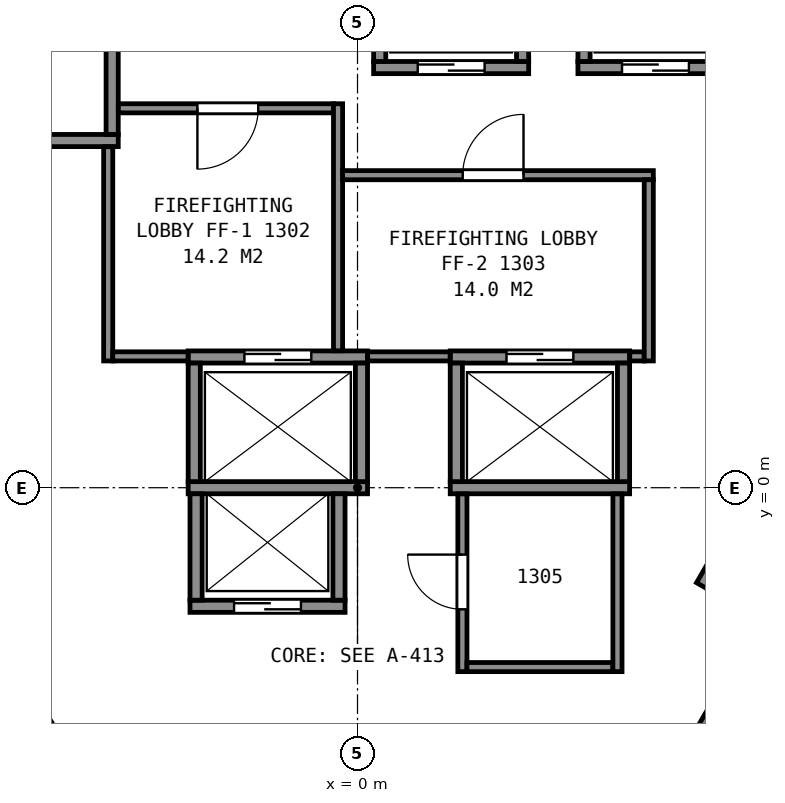
"""IFC4 building model, lengths in metres.
Left out: names, types, materials, properties, quantities, classifications, styles, units other than length and angle.
Written with IfcOpenShell. Run it as: python <this file> out.ifc"""

import sys

from ifc_helpers import new_model, si_unit, direction, frame, frame_2d, origin, place, context, subcontext, project, spatial, rectangle, extrude, element, fill, save


model = new_model("IFC4")
c1 = context("Model", 3, precision=1e-05, world=origin(), true_north=direction((0.0, 1.0)))
c2 = subcontext(c1, "Body", "Model", "MODEL_VIEW")
j1 = project(units=[si_unit("LENGTHUNIT", "METRE"), si_unit("PLANEANGLEUNIT", "RADIAN")], contexts=[c1])
p1 = place(None, origin())
s1 = spatial("IfcSite", under=j1, at=p1, CompositionType="ELEMENT")
p2 = place(p1, origin())
s2 = spatial("IfcBuilding", under=s1, at=p2, CompositionType="ELEMENT")
p3 = place(p2, frame((0.0, 0.0, 62.0)))
s3 = spatial("IfcBuildingStorey", under=s2, at=p3, CompositionType="ELEMENT", Elevation=62.0)
p4 = place(p3, frame((-2.755, -1.95, 0.0), z_axis=(0.0, 0.0, 1.0), x_axis=(1.0, 0.0, 0.0)))
e1 = element("IfcWall", 1, at=p4, inside=s3, PredefinedType="PARTITIONING", context=c2, shape_type="SweptSolid", body=[
    extrude(rectangle(XDim=2.55, YDim=0.2, at=frame_2d((1.275, 0.0))), origin(), (0.0, 0.0, 1.0), 3.6),
])
p5 = place(p4, frame((0.725, 0.0, 0.0)))
e2 = element("IfcOpeningElement", 2, at=p5, cuts=e1, PredefinedType="OPENING", context=c2, shape_type="SweptSolid", body=[
    extrude(rectangle(XDim=1.1, YDim=2.1, at=frame_2d((0.55, 1.05))), frame((0.0, 0.11, 0.0), z_axis=(0.0, -1.0, 0.0), x_axis=(1.0, 0.0, 0.0)), (0.0, 0.0, 1.0), 0.22),
])
p6 = place(p3, frame((-2.785, 0.0, 0.0), z_axis=(0.0, 0.0, 1.0), x_axis=(1.0, 0.0, 0.0)))
e3 = element("IfcWall", 3, at=p6, inside=s3, PredefinedType="PARTITIONING", context=c2, shape_type="SweptSolid", body=[
    extrude(rectangle(XDim=2.95, YDim=0.2, at=frame_2d((1.475, 0.0))), origin(), (0.0, 0.0, 1.0), 3.6),
])
p7 = place(p3, frame((1.525, 0.0, 0.0), z_axis=(0.0, 0.0, 1.0), x_axis=(1.0, 0.0, 0.0)))
e4 = element("IfcWall", 4, at=p7, inside=s3, PredefinedType="PARTITIONING", context=c2, shape_type="SweptSolid", body=[
    extrude(rectangle(XDim=2.95, YDim=0.2, at=frame_2d((1.475, 0.0))), origin(), (0.0, 0.0, 1.0), 3.6),
])
p8 = place(p3, frame((-2.785, 2.15, 0.0), z_axis=(0.0, 0.0, 1.0), x_axis=(1.0, 0.0, 0.0)))
e5 = element("IfcWall", 5, at=p8, inside=s3, PredefinedType="PARTITIONING", context=c2, shape_type="SweptSolid", body=[
    extrude(rectangle(XDim=2.95, YDim=0.2, at=frame_2d((1.475, 0.0))), origin(), (0.0, 0.0, 1.0), 3.6),
])
p9 = place(p8, frame((0.925, 0.0, 0.0)))
e6 = element("IfcOpeningElement", 6, at=p9, cuts=e5, PredefinedType="OPENING", context=c2, shape_type="SweptSolid", body=[
    extrude(rectangle(XDim=1.1, YDim=2.1, at=frame_2d((0.55, 1.05))), frame((0.0, 0.11, 0.0), z_axis=(0.0, -1.0, 0.0), x_axis=(1.0, 0.0, 0.0)), (0.0, 0.0, 1.0), 0.22),
])
p10 = place(p3, frame((1.525, 2.15, 0.0), z_axis=(0.0, 0.0, 1.0), x_axis=(1.0, 0.0, 0.0)))
e7 = element("IfcWall", 7, at=p10, inside=s3, PredefinedType="PARTITIONING", context=c2, shape_type="SweptSolid", body=[
    extrude(rectangle(XDim=2.95, YDim=0.2, at=frame_2d((1.475, 0.0))), origin(), (0.0, 0.0, 1.0), 3.6),
])
p11 = place(p10, frame((0.925, 0.0, 0.0)))
e8 = element("IfcOpeningElement", 8, at=p11, cuts=e7, PredefinedType="OPENING", context=c2, shape_type="SweptSolid", body=[
    extrude(rectangle(XDim=1.1, YDim=2.1, at=frame_2d((0.55, 1.05))), frame((0.0, 0.11, 0.0), z_axis=(0.0, -1.0, 0.0), x_axis=(1.0, 0.0, 0.0)), (0.0, 0.0, 1.0), 0.22),
])
p12 = place(p3, frame((-6.285, 5.71, 0.0), z_axis=(0.0, 0.0, 1.0), x_axis=(1.0, 0.0, 0.0)))
e9 = element("IfcWall", 9, at=p12, inside=s3, PredefinedType="PARTITIONING", context=c2, shape_type="SweptSolid", body=[
    extrude(rectangle(XDim=2.35, YDim=0.2, at=frame_2d((1.175, 0.0))), origin(), (0.0, 0.0, 1.0), 3.6),
])
p13 = place(p3, frame((0.265, 6.91, 0.0), z_axis=(0.0, 0.0, 1.0), x_axis=(1.0, 0.0, 0.0)))
e10 = element("IfcWall", 10, at=p13, inside=s3, PredefinedType="PARTITIONING", context=c2, shape_type="SweptSolid", body=[
    extrude(rectangle(XDim=2.55, YDim=0.2, at=frame_2d((1.275, 0.0))), origin(), (0.0, 0.0, 1.0), 3.6),
])
p14 = place(p13, frame((0.725, 0.0, 0.0)))
e11 = element("IfcOpeningElement", 11, at=p14, cuts=e10, PredefinedType="OPENING", context=c2, shape_type="SweptSolid", body=[
    extrude(rectangle(XDim=1.1, YDim=2.1, at=frame_2d((0.55, 1.05))), frame((0.0, 0.11, 0.0), z_axis=(0.0, -1.0, 0.0), x_axis=(1.0, 0.0, 0.0)), (0.0, 0.0, 1.0), 0.22),
])
p15 = place(p3, frame((3.625, 6.91, 0.0), z_axis=(0.0, 0.0, 1.0), x_axis=(1.0, 0.0, 0.0)))
e12 = element("IfcWall", 12, at=p15, inside=s3, PredefinedType="PARTITIONING", context=c2, shape_type="SweptSolid", body=[
    extrude(rectangle(XDim=2.55, YDim=0.2, at=frame_2d((1.275, 0.0))), origin(), (0.0, 0.0, 1.0), 3.6),
])
p16 = place(p15, frame((0.725, 0.0, 0.0)))
e13 = element("IfcOpeningElement", 13, at=p16, cuts=e12, PredefinedType="OPENING", context=c2, shape_type="SweptSolid", body=[
    extrude(rectangle(XDim=1.1, YDim=2.1, at=frame_2d((0.55, 1.05))), frame((0.0, 0.11, 0.0), z_axis=(0.0, -1.0, 0.0), x_axis=(1.0, 0.0, 0.0)), (0.0, 0.0, 1.0), 0.22),
])
p17 = place(p3, frame((5.527, -4.247, 0.0), z_axis=(0.0, 0.0, 1.0), x_axis=(0.499938297808, 0.866061024631, 0.0)))
e14 = element("IfcWall", 14, at=p17, inside=s3, PredefinedType="PARTITIONING", context=c2, shape_type="SweptSolid", body=[
    extrude(rectangle(XDim=2.35, YDim=0.2, at=frame_2d((1.175, 0.0))), origin(), (0.0, 0.0, 1.0), 3.6),
])
p18 = place(p17, frame((0.725, 0.0, 0.0)))
e15 = element("IfcOpeningElement", 15, at=p18, cuts=e14, PredefinedType="OPENING", context=c2, shape_type="SweptSolid", body=[
    extrude(rectangle(XDim=1.1, YDim=2.1, at=frame_2d((0.55, 1.05))), frame((0.0, 0.11, 0.0), z_axis=(0.0, -1.0, 0.0), x_axis=(1.0, 0.0, 0.0)), (0.0, 0.0, 1.0), 0.22),
])
p19 = place(p3, frame((5.663, -1.612, 0.0), z_axis=(0.0, 0.0, 1.0), x_axis=(0.49998122708, 0.866036242063, 0.0)))
e16 = element("IfcWall", 16, at=p19, inside=s3, PredefinedType="PARTITIONING", context=c2, shape_type="SweptSolid", body=[
    extrude(rectangle(XDim=4.9, YDim=0.2, at=frame_2d((2.45, 0.0))), origin(), (0.0, 0.0, 1.0), 3.6),
])
p20 = place(p3, frame((4.375, 0.1, 0.0), z_axis=(0.0, 0.0, 1.0), x_axis=(0.0, 1.0, 0.0)))
e17 = element("IfcWall", 17, at=p20, inside=s3, PredefinedType="PARTITIONING", context=c2, shape_type="SweptSolid", body=[
    extrude(rectangle(XDim=1.95, YDim=0.2, at=frame_2d((0.975, 0.0))), origin(), (0.0, 0.0, 1.0), 3.6),
])
for number, where, z_axis, x_axis in (
    (18, (3.725, 7.01, 0.0), (0.0, 0.0, 1.0), (0.0, 1.0, 0.0)),
    (19, (2.715, 7.01, 0.0), (0.0, 0.0, 1.0), (0.0, 1.0, 0.0)),
):
    element("IfcWall", number, at=place(p3, frame(where, z_axis=z_axis, x_axis=x_axis)), inside=s3, PredefinedType="PARTITIONING", context=c2, shape_type="SweptSolid", body=[
        extrude(rectangle(XDim=1.75, YDim=0.2, at=frame_2d((0.875, 0.0))), origin(), (0.0, 0.0, 1.0), 3.6),
    ])
p21 = place(p3, frame((1.625, 0.1, 0.0), z_axis=(0.0, 0.0, 1.0), x_axis=(0.0, 1.0, 0.0)))
e20 = element("IfcWall", 20, at=p21, inside=s3, PredefinedType="PARTITIONING", context=c2, shape_type="SweptSolid", body=[
    extrude(rectangle(XDim=1.95, YDim=0.2, at=frame_2d((0.975, 0.0))), origin(), (0.0, 0.0, 1.0), 3.6),
])
p22 = place(p3, frame((0.365, 7.01, 0.0), z_axis=(0.0, 0.0, 1.0), x_axis=(0.0, 1.0, 0.0)))
e21 = element("IfcWall", 21, at=p22, inside=s3, PredefinedType="PARTITIONING", context=c2, shape_type="SweptSolid", body=[
    extrude(rectangle(XDim=1.75, YDim=0.2, at=frame_2d((0.875, 0.0))), origin(), (0.0, 0.0, 1.0), 3.6),
])
p23 = place(p3, frame((0.065, 0.1, 0.0), z_axis=(0.0, 0.0, 1.0), x_axis=(0.0, 1.0, 0.0)))
e22 = element("IfcWall", 22, at=p23, inside=s3, PredefinedType="PARTITIONING", context=c2, shape_type="SweptSolid", body=[
    extrude(rectangle(XDim=1.95, YDim=0.2, at=frame_2d((0.975, 0.0))), origin(), (0.0, 0.0, 1.0), 3.6),
])
for number, where, z_axis, x_axis in (
    (23, (-0.305, -1.85, 0.0), (0.0, 0.0, 1.0), (0.0, 1.0, 0.0)),
    (24, (-2.655, -1.85, 0.0), (0.0, 0.0, 1.0), (0.0, 1.0, 0.0)),
):
    element("IfcWall", number, at=place(p3, frame(where, z_axis=z_axis, x_axis=x_axis)), inside=s3, PredefinedType="PARTITIONING", context=c2, shape_type="SweptSolid", body=[
        extrude(rectangle(XDim=1.75, YDim=0.2, at=frame_2d((0.875, 0.0))), origin(), (0.0, 0.0, 1.0), 3.6),
    ])
p24 = place(p3, frame((-2.685, 0.1, 0.0), z_axis=(0.0, 0.0, 1.0), x_axis=(0.0, 1.0, 0.0)))
e25 = element("IfcWall", 25, at=p24, inside=s3, PredefinedType="PARTITIONING", context=c2, shape_type="SweptSolid", body=[
    extrude(rectangle(XDim=1.95, YDim=0.2, at=frame_2d((0.975, 0.0))), origin(), (0.0, 0.0, 1.0), 3.6),
])
p25 = place(p3, frame((-4.035, 5.81, 0.0), z_axis=(0.0, 0.0, 1.0), x_axis=(0.0, 1.0, 0.0)))
e26 = element("IfcWall", 26, at=p25, inside=s3, PredefinedType="PARTITIONING", context=c2, shape_type="SweptSolid", body=[
    extrude(rectangle(XDim=1.75, YDim=0.2, at=frame_2d((0.875, 0.0))), origin(), (0.0, 0.0, 1.0), 3.6),
])
p26 = place(p3, frame((-13.664, 5.946, 0.0), z_axis=(0.0, 0.0, 1.0), x_axis=(0.499994327219, -0.866028678941, 0.0)))
e27 = element("IfcWall", 27, at=p26, inside=s3, PredefinedType="PARTITIONING", context=c2, shape_type="SweptSolid", body=[
    extrude(rectangle(XDim=23.968, YDim=0.2, at=frame_2d((11.984, 0.0))), origin(), (0.0, 0.0, 1.0), 3.35),
])
p27 = place(p3, frame((-4.091, -5.635, 0.0), z_axis=(0.0, 0.0, 1.0), x_axis=(-0.499948934428, 0.866054884499, 0.0)))
e28 = element("IfcWall", 28, at=p27, inside=s3, PredefinedType="PARTITIONING", context=c2, shape_type="SweptSolid", body=[
    extrude(rectangle(XDim=3.577, YDim=0.15, at=frame_2d((1.789, 0.0))), origin(), (0.0, 0.0, 1.0), 3.35),
])
p28 = place(p27, frame((2.377, 0.0, 0.0)))
e29 = element("IfcOpeningElement", 29, at=p28, cuts=e28, PredefinedType="OPENING", context=c2, shape_type="SweptSolid", body=[
    extrude(rectangle(XDim=0.9, YDim=2.1, at=frame_2d((0.45, 1.05))), frame((0.0, 0.085, 0.0), z_axis=(0.0, -1.0, 0.0), x_axis=(1.0, 0.0, 0.0)), (0.0, 0.0, 1.0), 0.17),
])
p29 = place(p27, frame((0.605, 0.0, 0.0)))
e30 = element("IfcOpeningElement", 30, at=p29, cuts=e28, PredefinedType="OPENING", context=c2, shape_type="SweptSolid", body=[
    extrude(rectangle(XDim=0.9, YDim=2.1, at=frame_2d((0.45, 1.05))), frame((0.0, 0.085, 0.0), z_axis=(0.0, -1.0, 0.0), x_axis=(1.0, 0.0, 0.0)), (0.0, 0.0, 1.0), 0.17),
])
p30 = place(p3, frame((-4.1, 2.085, 0.0), z_axis=(0.0, 0.0, 1.0), x_axis=(0.0, 1.0, 0.0)))
e31 = element("IfcWall", 31, at=p30, inside=s3, PredefinedType="PARTITIONING", context=c2, shape_type="SweptSolid", body=[
    extrude(rectangle(XDim=3.523, YDim=0.15, at=frame_2d((1.761, 0.0))), origin(), (0.0, 0.0, 1.0), 3.35),
])
p31 = place(p3, frame((-4.025, 2.16, 0.0), z_axis=(0.0, 0.0, 1.0), x_axis=(1.0, 0.0, 0.0)))
e32 = element("IfcWall", 32, at=p31, inside=s3, PredefinedType="PARTITIONING", context=c2, shape_type="SweptSolid", body=[
    extrude(rectangle(XDim=1.238, YDim=0.15, at=frame_2d((0.619, 0.0))), origin(), (0.0, 0.0, 1.0), 3.35),
])
p32 = place(p3, frame((-3.933, 6.24, 0.0), z_axis=(0.0, 0.0, 1.0), x_axis=(1.0, 0.0, 0.0)))
e33 = element("IfcWall", 33, at=p32, inside=s3, PredefinedType="PARTITIONING", context=c2, shape_type="SweptSolid", body=[
    extrude(rectangle(XDim=3.538, YDim=0.15, at=frame_2d((1.769, 0.0))), origin(), (0.0, 0.0, 1.0), 3.35),
])
p33 = place(p32, frame((1.3, 0.0, 0.0)))
e34 = element("IfcOpeningElement", 34, at=p33, cuts=e33, PredefinedType="OPENING", context=c2, shape_type="SweptSolid", body=[
    extrude(rectangle(XDim=1.0, YDim=2.1, at=frame_2d((0.5, 1.05))), frame((0.0, 0.085, 0.0), z_axis=(0.0, -1.0, 0.0), x_axis=(1.0, 0.0, 0.0)), (0.0, 0.0, 1.0), 0.17),
])
p34 = place(p3, frame((-0.32, 2.252, 0.0), z_axis=(0.0, 0.0, 1.0), x_axis=(0.0, 1.0, 0.0)))
e35 = element("IfcWall", 35, at=p34, inside=s3, PredefinedType="PARTITIONING", context=c2, shape_type="SweptSolid", body=[
    extrude(rectangle(XDim=4.063, YDim=0.15, at=frame_2d((2.031, 0.0))), origin(), (0.0, 0.0, 1.0), 3.35),
])
p35 = place(p3, frame((-0.245, 5.14, 0.0), z_axis=(0.0, 0.0, 1.0), x_axis=(1.0, 0.0, 0.0)))
e36 = element("IfcWall", 36, at=p35, inside=s3, PredefinedType="PARTITIONING", context=c2, shape_type="SweptSolid", body=[
    extrude(rectangle(XDim=5.11, YDim=0.15, at=frame_2d((2.555, 0.0))), origin(), (0.0, 0.0, 1.0), 3.35),
])
p36 = place(p35, frame((1.975, 0.0, 0.0)))
e37 = element("IfcOpeningElement", 37, at=p36, cuts=e36, PredefinedType="OPENING", context=c2, shape_type="SweptSolid", body=[
    extrude(rectangle(XDim=1.0, YDim=2.1, at=frame_2d((0.5, 1.05))), frame((0.0, 0.085, 0.0), z_axis=(0.0, -1.0, 0.0), x_axis=(1.0, 0.0, 0.0)), (0.0, 0.0, 1.0), 0.17),
])
p37 = place(p3, frame((0.167, 2.16, 0.0), z_axis=(0.0, 0.0, 1.0), x_axis=(1.0, 0.0, 0.0)))
e38 = element("IfcWall", 38, at=p37, inside=s3, PredefinedType="PARTITIONING", context=c2, shape_type="SweptSolid", body=[
    extrude(rectangle(XDim=1.356, YDim=0.15, at=frame_2d((0.678, 0.0))), origin(), (0.0, 0.0, 1.0), 3.35),
])
p38 = place(p3, frame((1.725, -0.102, 0.0), z_axis=(0.0, 0.0, 1.0), x_axis=(0.0, -1.0, 0.0)))
e39 = element("IfcWall", 39, at=p38, inside=s3, PredefinedType="PARTITIONING", context=c2, shape_type="SweptSolid", body=[
    extrude(rectangle(XDim=2.923, YDim=0.15, at=frame_2d((1.461, 0.0))), origin(), (0.0, 0.0, 1.0), 3.35),
])
p39 = place(p38, frame((0.998, 0.0, 0.0)))
e40 = element("IfcOpeningElement", 40, at=p39, cuts=e39, PredefinedType="OPENING", context=c2, shape_type="SweptSolid", body=[
    extrude(rectangle(XDim=0.9, YDim=2.1, at=frame_2d((0.45, 1.05))), frame((0.0, 0.085, 0.0), z_axis=(0.0, -1.0, 0.0), x_axis=(1.0, 0.0, 0.0)), (0.0, 0.0, 1.0), 0.17),
])
p40 = place(p3, frame((1.8, -2.95, 0.0), z_axis=(0.0, 0.0, 1.0), x_axis=(1.0, 0.0, 0.0)))
e41 = element("IfcWall", 41, at=p40, inside=s3, PredefinedType="PARTITIONING", context=c2, shape_type="SweptSolid", body=[
    extrude(rectangle(XDim=2.4, YDim=0.15, at=frame_2d((1.2, 0.0))), origin(), (0.0, 0.0, 1.0), 3.35),
])
p41 = place(p3, frame((4.275, -3.025, 0.0), z_axis=(0.0, 0.0, 1.0), x_axis=(0.0, 1.0, 0.0)))
e42 = element("IfcWall", 42, at=p41, inside=s3, PredefinedType="PARTITIONING", context=c2, shape_type="SweptSolid", body=[
    extrude(rectangle(XDim=2.923, YDim=0.15, at=frame_2d((1.461, 0.0))), origin(), (0.0, 0.0, 1.0), 3.35),
])
p42 = place(p3, frame((4.477, 2.16, 0.0), z_axis=(0.0, 0.0, 1.0), x_axis=(1.0, 0.0, 0.0)))
e43 = element("IfcWall", 43, at=p42, inside=s3, PredefinedType="PARTITIONING", context=c2, shape_type="SweptSolid", body=[
    extrude(rectangle(XDim=0.238, YDim=0.15, at=frame_2d((0.119, 0.0))), origin(), (0.0, 0.0, 1.0), 3.35),
])
p43 = place(p3, frame((4.79, 2.085, 0.0), z_axis=(0.0, 0.0, 1.0), x_axis=(0.0, 1.0, 0.0)))
e44 = element("IfcWall", 44, at=p43, inside=s3, PredefinedType="PARTITIONING", context=c2, shape_type="SweptSolid", body=[
    extrude(rectangle(XDim=2.98, YDim=0.15, at=frame_2d((1.49, 0.0))), origin(), (0.0, 0.0, 1.0), 3.35),
])
p44 = place(p3, frame((-3.766, -17.558, 0.0), z_axis=(0.0, 0.0, 1.0), x_axis=(-0.500008349927, 0.866020582898, 0.0)))
e45 = element("IfcWall", 45, at=p44, inside=s3, PredefinedType="PARTITIONING", context=c2, shape_type="SweptSolid", body=[
    extrude(rectangle(XDim=22.496, YDim=0.125, at=frame_2d((11.248, 0.0))), origin(), (0.0, 0.0, 1.0), 2.613),
])
p45 = place(p44, frame((20.563, 0.0, 0.0)))
e46 = element("IfcOpeningElement", 46, at=p45, cuts=e45, PredefinedType="OPENING", context=c2, shape_type="SweptSolid", body=[
    extrude(rectangle(XDim=0.9, YDim=2.1, at=frame_2d((0.45, 1.05))), frame((0.0, 0.073, 0.0), z_axis=(0.0, -1.0, 0.0), x_axis=(1.0, 0.0, 0.0)), (0.0, 0.0, 1.0), 0.145),
])
p46 = place(p44, frame((13.476, 0.0, 0.0)))
e47 = element("IfcOpeningElement", 47, at=p46, cuts=e45, PredefinedType="OPENING", context=c2, shape_type="SweptSolid", body=[
    extrude(rectangle(XDim=0.9, YDim=2.1, at=frame_2d((0.45, 1.05))), frame((0.0, 0.073, 0.0), z_axis=(0.0, -1.0, 0.0), x_axis=(1.0, 0.0, 0.0)), (0.0, 0.0, 1.0), 0.145),
])
p47 = place(p44, frame((10.684, 0.0, 0.0)))
e48 = element("IfcOpeningElement", 48, at=p47, cuts=e45, PredefinedType="OPENING", context=c2, shape_type="SweptSolid", body=[
    extrude(rectangle(XDim=0.9, YDim=2.1, at=frame_2d((0.45, 1.05))), frame((0.0, 0.073, 0.0), z_axis=(0.0, -1.0, 0.0), x_axis=(1.0, 0.0, 0.0)), (0.0, 0.0, 1.0), 0.145),
])
p48 = place(p44, frame((3.948, 0.0, 0.0)))
e49 = element("IfcOpeningElement", 49, at=p48, cuts=e45, PredefinedType="OPENING", context=c2, shape_type="SweptSolid", body=[
    extrude(rectangle(XDim=0.9, YDim=2.1, at=frame_2d((0.45, 1.05))), frame((0.0, 0.073, 0.0), z_axis=(0.0, -1.0, 0.0), x_axis=(1.0, 0.0, 0.0)), (0.0, 0.0, 1.0), 0.145),
])
p49 = place(p44, frame((1.411, 0.0, 0.0)))
e50 = element("IfcOpeningElement", 50, at=p49, cuts=e45, PredefinedType="OPENING", context=c2, shape_type="SweptSolid", body=[
    extrude(rectangle(XDim=0.9, YDim=2.1, at=frame_2d((0.45, 1.05))), frame((0.0, 0.073, 0.0), z_axis=(0.0, -1.0, 0.0), x_axis=(1.0, 0.0, 0.0)), (0.0, 0.0, 1.0), 0.145),
])
p50 = place(p3, frame((17.486, 6.206, 0.0), z_axis=(0.0, 0.0, 1.0), x_axis=(-0.499990458811, -0.866030912322, 0.0)))
e51 = element("IfcWall", 51, at=p50, inside=s3, PredefinedType="PARTITIONING", context=c2, shape_type="SweptSolid", body=[
    extrude(rectangle(XDim=27.441, YDim=0.125, at=frame_2d((13.721, 0.0))), origin(), (0.0, 0.0, 1.0), 2.613),
])
p51 = place(p50, frame((20.529, 0.0, 0.0)))
e52 = element("IfcOpeningElement", 52, at=p51, cuts=e51, PredefinedType="OPENING", context=c2, shape_type="SweptSolid", body=[
    extrude(rectangle(XDim=0.9, YDim=2.1, at=frame_2d((0.45, 1.05))), frame((0.0, 0.073, 0.0), z_axis=(0.0, -1.0, 0.0), x_axis=(1.0, 0.0, 0.0)), (0.0, 0.0, 1.0), 0.145),
])
p52 = place(p50, frame((17.516, 0.0, 0.0)))
e53 = element("IfcOpeningElement", 53, at=p52, cuts=e51, PredefinedType="OPENING", context=c2, shape_type="SweptSolid", body=[
    extrude(rectangle(XDim=0.9, YDim=2.1, at=frame_2d((0.45, 1.05))), frame((0.0, 0.073, 0.0), z_axis=(0.0, -1.0, 0.0), x_axis=(1.0, 0.0, 0.0)), (0.0, 0.0, 1.0), 0.145),
])
p53 = place(p50, frame((10.168, 0.0, 0.0)))
e54 = element("IfcOpeningElement", 54, at=p53, cuts=e51, PredefinedType="OPENING", context=c2, shape_type="SweptSolid", body=[
    extrude(rectangle(XDim=0.9, YDim=2.1, at=frame_2d((0.45, 1.05))), frame((0.0, 0.073, 0.0), z_axis=(0.0, -1.0, 0.0), x_axis=(1.0, 0.0, 0.0)), (0.0, 0.0, 1.0), 0.145),
])
p54 = place(p50, frame((7.403, 0.0, 0.0)))
e55 = element("IfcOpeningElement", 55, at=p54, cuts=e51, PredefinedType="OPENING", context=c2, shape_type="SweptSolid", body=[
    extrude(rectangle(XDim=0.9, YDim=2.1, at=frame_2d((0.45, 1.05))), frame((0.0, 0.073, 0.0), z_axis=(0.0, -1.0, 0.0), x_axis=(1.0, 0.0, 0.0)), (0.0, 0.0, 1.0), 0.145),
])
p55 = place(p50, frame((0.741, 0.0, 0.0)))
e56 = element("IfcOpeningElement", 56, at=p55, cuts=e51, PredefinedType="OPENING", context=c2, shape_type="SweptSolid", body=[
    extrude(rectangle(XDim=0.9, YDim=2.1, at=frame_2d((0.45, 1.05))), frame((0.0, 0.073, 0.0), z_axis=(0.0, -1.0, 0.0), x_axis=(1.0, 0.0, 0.0)), (0.0, 0.0, 1.0), 0.145),
])
p56 = place(p14, origin())
e57 = element("IfcDoor", 57, at=p56, inside=s3, OperationType="SLIDING_TO_LEFT", PredefinedType="DOOR", context=c2, shape_type="SweptSolid", body=[
    extrude(rectangle(XDim=1.1, YDim=2.1, at=frame_2d((0.55, 1.05))), frame((0.0, 0.025, 0.0), z_axis=(0.0, -1.0, 0.0), x_axis=(1.0, 0.0, 0.0)), (0.0, 0.0, 1.0), 0.05),
])
fill(e11, e57)
p57 = place(p5, origin())
e58 = element("IfcDoor", 58, at=p57, inside=s3, OperationType="SLIDING_TO_RIGHT", PredefinedType="DOOR", context=c2, shape_type="SweptSolid", body=[
    extrude(rectangle(XDim=1.1, YDim=2.1, at=frame_2d((0.55, 1.05))), frame((0.0, 0.025, 0.0), z_axis=(0.0, -1.0, 0.0), x_axis=(1.0, 0.0, 0.0)), (0.0, 0.0, 1.0), 0.05),
])
fill(e2, e58)
p58 = place(p16, origin())
e59 = element("IfcDoor", 59, at=p58, inside=s3, OperationType="SLIDING_TO_LEFT", PredefinedType="DOOR", context=c2, shape_type="SweptSolid", body=[
    extrude(rectangle(XDim=1.1, YDim=2.1, at=frame_2d((0.55, 1.05))), frame((0.0, 0.025, 0.0), z_axis=(0.0, -1.0, 0.0), x_axis=(1.0, 0.0, 0.0)), (0.0, 0.0, 1.0), 0.05),
])
fill(e13, e59)
p59 = place(p9, origin())
e60 = element("IfcDoor", 60, at=p59, inside=s3, OperationType="SLIDING_TO_LEFT", PredefinedType="DOOR", context=c2, shape_type="SweptSolid", body=[
    extrude(rectangle(XDim=1.1, YDim=2.1, at=frame_2d((0.55, 1.05))), frame((0.0, 0.025, 0.0), z_axis=(0.0, -1.0, 0.0), x_axis=(1.0, 0.0, 0.0)), (0.0, 0.0, 1.0), 0.05),
])
fill(e6, e60)
p60 = place(p11, origin())
e61 = element("IfcDoor", 61, at=p60, inside=s3, OperationType="SLIDING_TO_RIGHT", PredefinedType="DOOR", context=c2, shape_type="SweptSolid", body=[
    extrude(rectangle(XDim=1.1, YDim=2.1, at=frame_2d((0.55, 1.05))), frame((0.0, 0.025, 0.0), z_axis=(0.0, -1.0, 0.0), x_axis=(1.0, 0.0, 0.0)), (0.0, 0.0, 1.0), 0.05),
])
fill(e8, e61)
p61 = place(p33, origin())
e62 = element("IfcDoor", 62, at=p61, inside=s3, OperationType="SINGLE_SWING_LEFT", PredefinedType="DOOR", context=c2, shape_type="SweptSolid", body=[
    extrude(rectangle(XDim=1.0, YDim=2.1, at=frame_2d((0.5, 1.05))), frame((0.0, 0.025, 0.0), z_axis=(0.0, -1.0, 0.0), x_axis=(1.0, 0.0, 0.0)), (0.0, 0.0, 1.0), 0.05),
])
fill(e34, e62)
p62 = place(p36, origin())
e63 = element("IfcDoor", 63, at=p62, inside=s3, OperationType="SINGLE_SWING_RIGHT", PredefinedType="DOOR", context=c2, shape_type="SweptSolid", body=[
    extrude(rectangle(XDim=1.0, YDim=2.1, at=frame_2d((0.5, 1.05))), frame((0.0, 0.025, 0.0), z_axis=(0.0, -1.0, 0.0), x_axis=(1.0, 0.0, 0.0)), (0.0, 0.0, 1.0), 0.05),
])
fill(e37, e63)
p63 = place(p39, origin())
e64 = element("IfcDoor", 64, at=p63, inside=s3, OperationType="SINGLE_SWING_LEFT", PredefinedType="DOOR", context=c2, shape_type="SweptSolid", body=[
    extrude(rectangle(XDim=0.9, YDim=2.1, at=frame_2d((0.45, 1.05))), frame((0.0, 0.025, 0.0), z_axis=(0.0, -1.0, 0.0), x_axis=(1.0, 0.0, 0.0)), (0.0, 0.0, 1.0), 0.05),
])
fill(e40, e64)
save(model, sys.argv[1])
